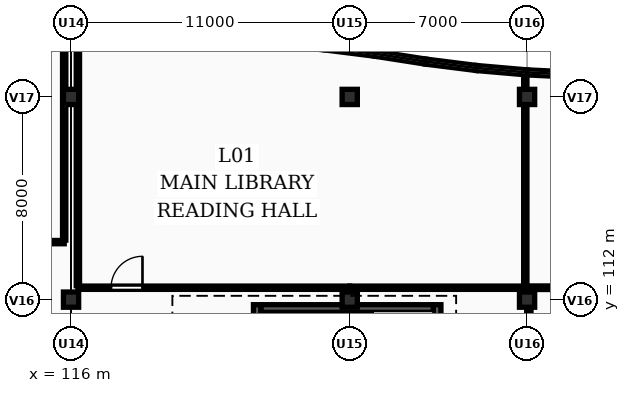
"""IFC4 building model, lengths in metres.
Left out: names, types, materials, properties, quantities, classifications, styles, units other than length and angle.
Written with IfcOpenShell. Run it as: python <this file> out.ifc"""

import sys

from ifc_helpers import new_model, si_unit, direction, frame, frame_2d, origin, origin_2d, place, context, subcontext, project, spatial, rectangle, extrude, element, fill, save


model = new_model("IFC4")
c1 = context("Model", 3, precision=1e-05, world=origin(), true_north=direction((0.0, 1.0)))
c2 = subcontext(c1, "Body", "Model", "MODEL_VIEW")
j1 = project(units=[si_unit("LENGTHUNIT", "METRE"), si_unit("PLANEANGLEUNIT", "RADIAN")], contexts=[c1])
p1 = place(None, origin())
s1 = spatial("IfcSite", under=j1, at=p1, CompositionType="ELEMENT")
p2 = place(p1, origin())
s2 = spatial("IfcBuilding", under=s1, at=p2, CompositionType="ELEMENT")
p3 = place(p2, frame((0.0, 0.0, 4.5)))
s3 = spatial("IfcBuildingStorey", under=s2, at=p3, CompositionType="ELEMENT", Elevation=4.5)
for number, where, z_axis, x_axis in (
    (1, (116.0, 112.0, 0.0), (0.0, 0.0, 1.0), (1.0, 0.0, 0.0)),
    (2, (116.0, 120.0, 0.0), (0.0, 0.0, 1.0), (1.0, 0.0, 0.0)),
    (3, (127.0, 112.0, 0.0), (0.0, 0.0, 1.0), (1.0, 0.0, 0.0)),
    (4, (127.0, 120.0, 0.0), (0.0, 0.0, 1.0), (1.0, 0.0, 0.0)),
    (5, (134.0, 112.0, 0.0), (0.0, 0.0, 1.0), (1.0, 0.0, 0.0)),
    (6, (134.0, 120.0, 0.0), (0.0, 0.0, 1.0), (1.0, 0.0, 0.0)),
):
    element("IfcColumn", number, at=place(p3, frame(where, z_axis=z_axis, x_axis=x_axis)), inside=s3, PredefinedType="COLUMN", context=c2, shape_type="SweptSolid", body=[
        extrude(rectangle(XDim=0.6, YDim=0.6, at=origin_2d()), origin(), (0.0, 0.0, 1.0), 3.9),
    ])
p4 = place(p3, frame((114.0, 121.842, 0.0), z_axis=(0.0, 0.0, 1.0), x_axis=(0.994395160059, 0.105727317433, 0.0)))
e7 = element("IfcWall", 7, at=p4, inside=s3, PredefinedType="SOLIDWALL", context=c2, shape_type="SweptSolid", body=[
    extrude(rectangle(XDim=2.011, YDim=0.2, at=frame_2d((1.006, 0.0))), origin(), (0.0, 0.0, 1.0), 0.95),
])
p5 = place(p3, frame((126.0, 121.958, 0.0), z_axis=(0.0, 0.0, 1.0), x_axis=(0.992158168336, -0.124988675503, 0.0)))
e8 = element("IfcWall", 8, at=p5, inside=s3, PredefinedType="SOLIDWALL", context=c2, shape_type="SweptSolid", body=[
    extrude(rectangle(XDim=2.016, YDim=0.2, at=frame_2d((1.008, 0.0))), origin(), (0.0, 0.0, 1.0), 0.95),
])
p6 = place(p3, frame((128.0, 121.706, 0.0), z_axis=(0.0, 0.0, 1.0), x_axis=(0.988085509852, -0.153905897287, 0.0)))
e9 = element("IfcWall", 9, at=p6, inside=s3, PredefinedType="SOLIDWALL", context=c2, shape_type="SweptSolid", body=[
    extrude(rectangle(XDim=2.024, YDim=0.2, at=frame_2d((1.012, 0.0))), origin(), (0.0, 0.0, 1.0), 0.95),
])
p7 = place(p3, frame((130.0, 121.394, 0.0), z_axis=(0.0, 0.0, 1.0), x_axis=(0.992158168336, -0.124988675503, 0.0)))
e10 = element("IfcWall", 10, at=p7, inside=s3, PredefinedType="SOLIDWALL", context=c2, shape_type="SweptSolid", body=[
    extrude(rectangle(XDim=2.016, YDim=0.2, at=frame_2d((1.008, 0.0))), origin(), (0.0, 0.0, 1.0), 0.95),
])
p8 = place(p3, frame((132.0, 121.142, 0.0), z_axis=(0.0, 0.0, 1.0), x_axis=(0.996244237948, -0.086587633962, 0.0)))
e11 = element("IfcWall", 11, at=p8, inside=s3, PredefinedType="SOLIDWALL", context=c2, shape_type="SweptSolid", body=[
    extrude(rectangle(XDim=2.008, YDim=0.2, at=frame_2d((1.004, 0.0))), origin(), (0.0, 0.0, 1.0), 0.95),
])
p9 = place(p3, frame((134.0, 120.969, 0.0), z_axis=(0.0, 0.0, 1.0), x_axis=(0.99884540439, -0.048040172037, 0.0)))
e12 = element("IfcWall", 12, at=p9, inside=s3, PredefinedType="SOLIDWALL", context=c2, shape_type="SweptSolid", body=[
    extrude(rectangle(XDim=2.002, YDim=0.2, at=frame_2d((1.001, 0.0))), origin(), (0.0, 0.0, 1.0), 0.95),
])
for number, where, z_axis, x_axis in (
    (13, (123.35, 107.7, 0.0), (0.0, 0.0, 1.0), (0.0, 1.0, 0.0)),
    (14, (130.45, 111.8, 0.0), (0.0, 0.0, 1.0), (0.0, -1.0, 0.0)),
):
    element("IfcWall", number, at=place(p3, frame(where, z_axis=z_axis, x_axis=x_axis)), inside=s3, PredefinedType="SHEAR", context=c2, shape_type="SweptSolid", body=[
        extrude(rectangle(XDim=4.1, YDim=0.3, at=frame_2d((2.05, 0.0))), origin(), (0.0, 0.0, 1.0), 3.65),
    ])
p10 = place(p3, frame((130.3, 111.65, 0.0), z_axis=(0.0, 0.0, 1.0), x_axis=(-1.0, 0.0, 0.0)))
e15 = element("IfcWall", 15, at=p10, inside=s3, PredefinedType="SHEAR", context=c2, shape_type="SweptSolid", body=[
    extrude(rectangle(XDim=6.8, YDim=0.3, at=frame_2d((3.4, 0.0))), origin(), (0.0, 0.0, 1.0), 3.65),
])
p11 = place(p3, frame((107.07, 114.27, 0.0), z_axis=(0.0, 0.0, 1.0), x_axis=(1.0, 0.0, 0.0)))
e16 = element("IfcWall", 16, at=p11, inside=s3, PredefinedType="PARTITIONING", context=c2, shape_type="SweptSolid", body=[
    extrude(rectangle(XDim=8.66, YDim=0.13, at=frame_2d((4.33, 0.0))), origin(), (0.0, 0.0, 1.0), 3.65),
])
p12 = place(p11, frame((3.86, 0.0, 0.0)))
e17 = element("IfcOpeningElement", 17, at=p12, cuts=e16, PredefinedType="OPENING", context=c2, shape_type="SweptSolid", body=[
    extrude(rectangle(XDim=1.14, YDim=2.2, at=frame_2d((0.57, 1.1))), frame((0.0, 0.075, 0.0), z_axis=(0.0, -1.0, 0.0), x_axis=(1.0, 0.0, 0.0)), (0.0, 0.0, 1.0), 0.15),
])
p13 = place(p3, frame((115.73, 114.35, 0.0), z_axis=(0.0, 0.0, 1.0), x_axis=(0.0, 1.0, 0.0)))
e18 = element("IfcWall", 18, at=p13, inside=s3, PredefinedType="PARTITIONING", context=c2, shape_type="SweptSolid", body=[
    extrude(rectangle(XDim=7.533, YDim=0.13, at=frame_2d((3.767, 0.0))), origin(), (0.0, 0.0, 1.0), 2.995),
])
p14 = place(p3, frame((116.27, 112.47, 0.0), z_axis=(0.0, 0.0, 1.0), x_axis=(1.0, 0.0, 0.0)))
e19 = element("IfcWall", 19, at=p14, inside=s3, PredefinedType="PARTITIONING", context=c2, shape_type="SweptSolid", body=[
    extrude(rectangle(XDim=10.73, YDim=0.13, at=frame_2d((5.365, 0.0))), origin(), (0.0, 0.0, 1.0), 3.65),
])
p15 = place(p14, frame((1.31, 0.0, 0.0)))
e20 = element("IfcOpeningElement", 20, at=p15, cuts=e19, PredefinedType="OPENING", context=c2, shape_type="SweptSolid", body=[
    extrude(rectangle(XDim=1.24, YDim=2.25, at=frame_2d((0.62, 1.125))), frame((0.0, 0.075, 0.0), z_axis=(0.0, -1.0, 0.0), x_axis=(1.0, 0.0, 0.0)), (0.0, 0.0, 1.0), 0.15),
])
p16 = place(p3, frame((127.0, 112.47, 0.0), z_axis=(0.0, 0.0, 1.0), x_axis=(1.0, 0.0, 0.0)))
e21 = element("IfcWall", 21, at=p16, inside=s3, PredefinedType="PARTITIONING", context=c2, shape_type="SweptSolid", body=[
    extrude(rectangle(XDim=6.93, YDim=0.13, at=frame_2d((3.465, 0.0))), origin(), (0.0, 0.0, 1.0), 3.65),
])
p17 = place(p3, frame((116.27, 112.55, 0.0), z_axis=(0.0, 0.0, 1.0), x_axis=(0.0, 1.0, 0.0)))
e22 = element("IfcWall", 22, at=p17, inside=s3, PredefinedType="PARTITIONING", context=c2, shape_type="SweptSolid", body=[
    extrude(rectangle(XDim=9.38, YDim=0.13, at=frame_2d((4.69, 0.0))), origin(), (0.0, 0.0, 1.0), 2.995),
])
p18 = place(p3, frame((133.93, 112.55, 0.0), z_axis=(0.0, 0.0, 1.0), x_axis=(0.0, 1.0, 0.0)))
e23 = element("IfcWall", 23, at=p18, inside=s3, PredefinedType="PARTITIONING", context=c2, shape_type="SweptSolid", body=[
    extrude(rectangle(XDim=8.28, YDim=0.13, at=frame_2d((4.14, 0.0))), origin(), (0.0, 0.0, 1.0), 2.995),
])
p19 = place(p3, frame((134.07, 112.47, 0.0), z_axis=(0.0, 0.0, 1.0), x_axis=(1.0, 0.0, 0.0)))
e24 = element("IfcWall", 24, at=p19, inside=s3, PredefinedType="PARTITIONING", context=c2, shape_type="SweptSolid", body=[
    extrude(rectangle(XDim=6.93, YDim=0.14, at=frame_2d((3.465, 0.0))), origin(), (0.0, 0.0, 1.0), 2.995),
])
p20 = place(p19, frame((2.69, 0.0, 0.0)))
e25 = element("IfcOpeningElement", 25, at=p20, cuts=e24, PredefinedType="OPENING", context=c2, shape_type="SweptSolid", body=[
    extrude(rectangle(XDim=1.48, YDim=2.25, at=frame_2d((0.74, 1.125))), frame((0.0, 0.08, 0.0), z_axis=(0.0, -1.0, 0.0), x_axis=(1.0, 0.0, 0.0)), (0.0, 0.0, 1.0), 0.16),
])
p21 = place(p3, frame((134.07, 107.77, 0.0), z_axis=(0.0, 0.0, 1.0), x_axis=(0.0, 1.0, 0.0)))
e26 = element("IfcWall", 26, at=p21, inside=s3, PredefinedType="PARTITIONING", context=c2, shape_type="SweptSolid", body=[
    extrude(rectangle(XDim=3.915, YDim=0.17, at=frame_2d((1.958, 0.0))), origin(), (0.0, 0.0, 1.0), 2.995),
])
p22 = place(p15, origin())
e27 = element("IfcDoor", 27, at=p22, inside=s3, OperationType="SINGLE_SWING_RIGHT", PredefinedType="DOOR", context=c2, shape_type="SweptSolid", body=[
    extrude(rectangle(XDim=1.24, YDim=2.25, at=frame_2d((0.62, 1.125))), frame((0.0, 0.025, 0.0), z_axis=(0.0, -1.0, 0.0), x_axis=(1.0, 0.0, 0.0)), (0.0, 0.0, 1.0), 0.05),
])
fill(e20, e27)
save(model, sys.argv[1])
